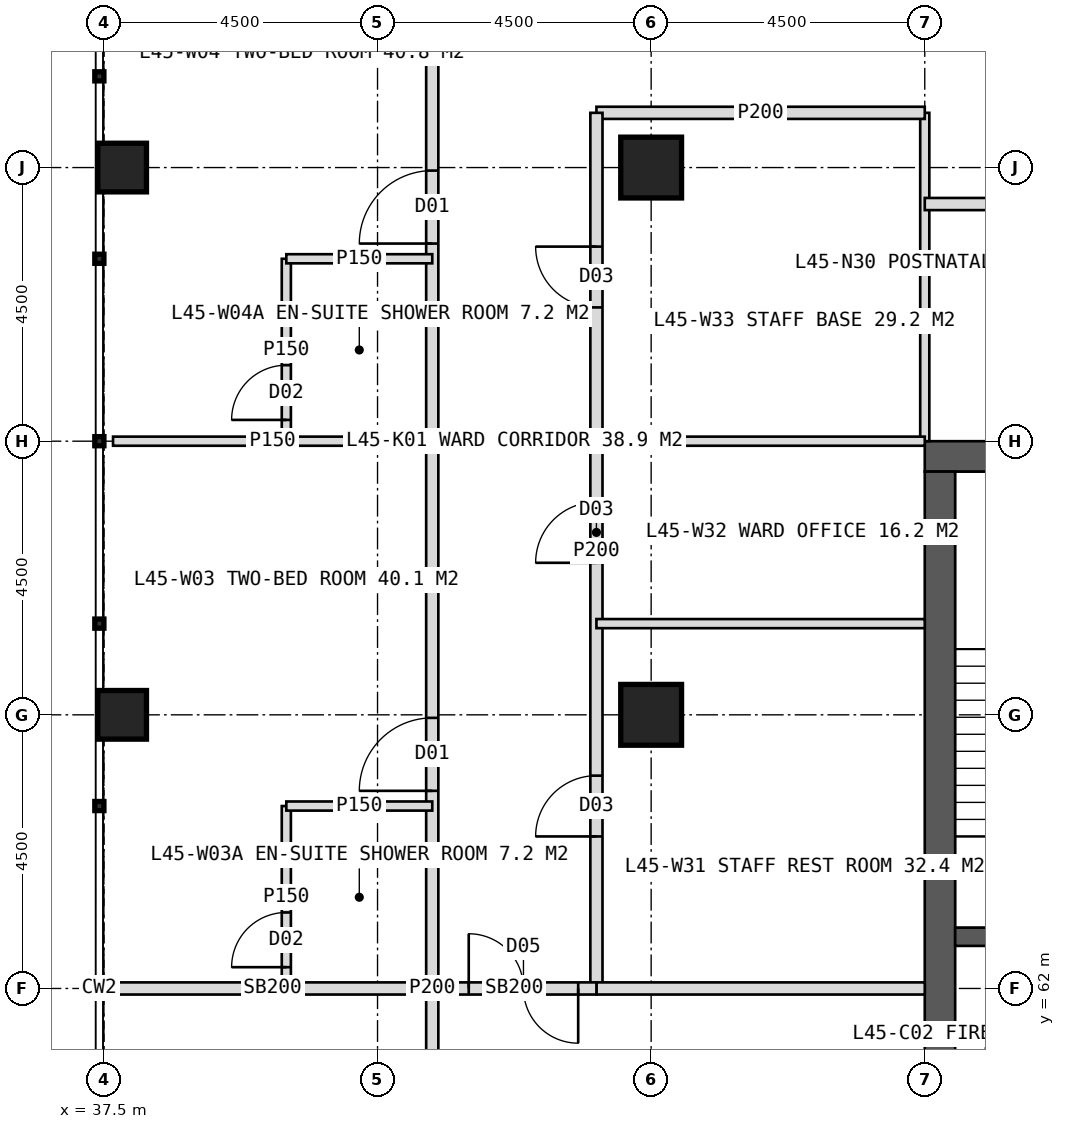
"""IFC4 building model, lengths in metres.
Left out: names, types, materials, properties, quantities, classifications, styles, units other than length and angle.
Written with IfcOpenShell. Run it as: python <this file> out.ifc"""

import sys

from ifc_helpers import new_model, si_unit, direction, frame, frame_2d, origin, origin_2d, place, context, subcontext, project, spatial, rectangle, hollow_rectangle, extrude, element, fill, save


model = new_model("IFC4")
c1 = context("Model", 3, precision=1e-05, world=origin(), true_north=direction((0.0, 1.0)))
c2 = subcontext(c1, "Body", "Model", "MODEL_VIEW")
j1 = project(units=[si_unit("LENGTHUNIT", "METRE"), si_unit("PLANEANGLEUNIT", "RADIAN")], contexts=[c1])
p1 = place(None, origin())
s1 = spatial("IfcSite", under=j1, at=p1, CompositionType="ELEMENT")
p2 = place(p1, origin())
s2 = spatial("IfcBuilding", under=s1, at=p2, CompositionType="ELEMENT")
p3 = place(p2, frame((0.0, 0.0, 189.0)))
s3 = spatial("IfcBuildingStorey", under=s2, at=p3, CompositionType="ELEMENT", Elevation=189.0)
p4 = place(p3, frame((51.0, 70.75, 0.0), z_axis=(0.0, 0.0, 1.0), x_axis=(1.0, 0.0, 0.0)))
e1 = element("IfcWall", 1, at=p4, inside=s3, PredefinedType="SHEAR", context=c2, shape_type="SweptSolid", body=[
    extrude(rectangle(XDim=18.0, YDim=0.5, at=frame_2d((9.0, 0.0))), origin(), (0.0, 0.0, 1.0), 4.0),
])
p5 = place(p4, frame((8.1, 0.0, 0.0)))
e2 = element("IfcOpeningElement", 2, at=p5, cuts=e1, PredefinedType="OPENING", context=c2, shape_type="SweptSolid", body=[
    extrude(rectangle(XDim=1.8, YDim=2.2, at=frame_2d((0.9, 1.1))), frame((0.0, 0.26, 0.0), z_axis=(0.0, -1.0, 0.0), x_axis=(1.0, 0.0, 0.0)), (0.0, 0.0, 1.0), 0.52),
])
p6 = place(p3, frame((51.25, 53.5, 0.0), z_axis=(0.0, 0.0, 1.0), x_axis=(0.0, 1.0, 0.0)))
e3 = element("IfcWall", 3, at=p6, inside=s3, PredefinedType="SHEAR", context=c2, shape_type="SweptSolid", body=[
    extrude(rectangle(XDim=17.0, YDim=0.5, at=frame_2d((8.5, 0.0))), origin(), (0.0, 0.0, 1.0), 4.0),
])
p7 = place(p6, frame((6.1, 0.0, 0.0)))
e4 = element("IfcOpeningElement", 4, at=p7, cuts=e3, PredefinedType="OPENING", context=c2, shape_type="SweptSolid", body=[
    extrude(rectangle(XDim=1.5, YDim=2.2, at=frame_2d((0.75, 1.1))), frame((0.0, 0.26, 0.0), z_axis=(0.0, -1.0, 0.0), x_axis=(1.0, 0.0, 0.0)), (0.0, 0.0, 1.0), 0.52),
])
p8 = place(p3, frame((51.5, 62.85, 0.0), z_axis=(0.0, 0.0, 1.0), x_axis=(1.0, 0.0, 0.0)))
e5 = element("IfcWall", 5, at=p8, inside=s3, PredefinedType="SHEAR", context=c2, shape_type="SweptSolid", body=[
    extrude(rectangle(XDim=3.3, YDim=0.3, at=frame_2d((1.65, 0.0))), origin(), (0.0, 0.0, 1.0), 4.0),
])
p9 = place(p8, frame((1.15, 0.0, 0.0)))
e6 = element("IfcOpeningElement", 6, at=p9, cuts=e5, PredefinedType="OPENING", context=c2, shape_type="SweptSolid", body=[
    extrude(rectangle(XDim=1.2, YDim=2.1, at=frame_2d((0.6, 1.05))), frame((0.0, 0.16, 0.0), z_axis=(0.0, -1.0, 0.0), x_axis=(1.0, 0.0, 0.0)), (0.0, 0.0, 1.0), 0.32),
])
for number, where, z_axis, x_axis in (
    (7, (46.5, 75.5, 0.0), (0.0, 0.0, 1.0), (1.0, 0.0, 0.0)),
    (8, (46.5, 66.5, 0.0), (0.0, 0.0, 1.0), (1.0, 0.0, 0.0)),
):
    element("IfcColumn", number, at=place(p3, frame(where, z_axis=z_axis, x_axis=x_axis)), inside=s3, PredefinedType="COLUMN", context=c2, shape_type="SweptSolid", body=[
        extrude(hollow_rectangle(XDim=1.0, YDim=1.0, WallThickness=0.1, at=origin_2d()), origin(), (0.0, 0.0, 1.0), 4.0),
    ])
for number, where, z_axis, x_axis in (
    (9, (37.8, 66.5, 0.0), (0.0, 0.0, 1.0), (1.0, 0.0, 0.0)),
    (10, (37.8, 75.5, 0.0), (0.0, 0.0, 1.0), (1.0, 0.0, 0.0)),
):
    element("IfcColumn", number, at=place(p3, frame(where, z_axis=z_axis, x_axis=x_axis)), inside=s3, PredefinedType="COLUMN", context=c2, shape_type="SweptSolid", body=[
        extrude(hollow_rectangle(XDim=0.8, YDim=0.8, WallThickness=0.08, at=origin_2d()), origin(), (0.0, 0.0, 1.0), 4.0),
    ])
p10 = place(p3, frame((51.0, 71.0, 0.0), z_axis=(0.0, 0.0, 1.0), x_axis=(0.0, 1.0, 0.0)))
e11 = element("IfcWall", 11, at=p10, inside=s3, PredefinedType="PARTITIONING", context=c2, shape_type="SweptSolid", body=[
    extrude(rectangle(XDim=5.4, YDim=0.15, at=frame_2d((2.7, 0.0))), origin(), (0.0, 0.0, 1.0), 3.75),
])
p11 = place(p3, frame((45.6, 76.4, 0.0), z_axis=(0.0, 0.0, 1.0), x_axis=(1.0, 0.0, 0.0)))
e12 = element("IfcWall", 12, at=p11, inside=s3, PredefinedType="PARTITIONING", context=c2, shape_type="SweptSolid", body=[
    extrude(rectangle(XDim=5.4, YDim=0.2, at=frame_2d((2.7, 0.0))), origin(), (0.0, 0.0, 1.0), 3.75),
])
p12 = place(p3, frame((51.0, 74.9, 0.0), z_axis=(0.0, 0.0, 1.0), x_axis=(1.0, 0.0, 0.0)))
e13 = element("IfcWall", 13, at=p12, inside=s3, PredefinedType="PARTITIONING", context=c2, shape_type="SweptSolid", body=[
    extrude(rectangle(XDim=6.75, YDim=0.2, at=frame_2d((3.375, 0.0))), origin(), (0.0, 0.0, 1.0), 3.75),
])
p13 = place(p12, frame((1.45, 0.0, 0.0)))
e14 = element("IfcOpeningElement", 14, at=p13, cuts=e13, PredefinedType="OPENING", context=c2, shape_type="SweptSolid", body=[
    extrude(rectangle(XDim=1.0, YDim=2.1, at=frame_2d((0.5, 1.05))), frame((0.0, 0.11, 0.0), z_axis=(0.0, -1.0, 0.0), x_axis=(1.0, 0.0, 0.0)), (0.0, 0.0, 1.0), 0.22),
])
p14 = place(p3, frame((42.9, 62.0, 0.0), z_axis=(0.0, 0.0, 1.0), x_axis=(-1.0, 0.0, 0.0)))
e15 = element("IfcWall", 15, at=p14, inside=s3, PredefinedType="SOLIDWALL", context=c2, shape_type="SweptSolid", body=[
    extrude(rectangle(XDim=5.25, YDim=0.2, at=frame_2d((2.625, 0.0))), origin(), (0.0, 0.0, 1.0), 2.95),
])
p15 = place(p3, frame((42.9, 71.0, 0.0), z_axis=(0.0, 0.0, 1.0), x_axis=(-1.0, 0.0, 0.0)))
e16 = element("IfcWall", 16, at=p15, inside=s3, PredefinedType="PARTITIONING", context=c2, shape_type="SweptSolid", body=[
    extrude(rectangle(XDim=5.25, YDim=0.15, at=frame_2d((2.625, 0.0))), origin(), (0.0, 0.0, 1.0), 3.75),
])
p16 = place(p3, frame((42.9, 44.9, 0.0), z_axis=(0.0, 0.0, 1.0), x_axis=(0.0, 1.0, 0.0)))
e17 = element("IfcWall", 17, at=p16, inside=s3, PredefinedType="PARTITIONING", context=c2, shape_type="SweptSolid", body=[
    extrude(rectangle(XDim=34.2, YDim=0.2, at=frame_2d((17.1, 0.0))), origin(), (0.0, 0.0, 1.0), 3.75),
])
p17 = place(p16, frame((3.25, 0.0, 0.0)))
e18 = element("IfcOpeningElement", 18, at=p17, cuts=e17, PredefinedType="OPENING", context=c2, shape_type="SweptSolid", body=[
    extrude(rectangle(XDim=1.2, YDim=2.2, at=frame_2d((0.6, 1.1))), frame((0.0, 0.11, 0.0), z_axis=(0.0, -1.0, 0.0), x_axis=(1.0, 0.0, 0.0)), (0.0, 0.0, 1.0), 0.22),
])
p18 = place(p16, frame((11.35, 0.0, 0.0)))
e19 = element("IfcOpeningElement", 19, at=p18, cuts=e17, PredefinedType="OPENING", context=c2, shape_type="SweptSolid", body=[
    extrude(rectangle(XDim=1.2, YDim=2.2, at=frame_2d((0.6, 1.1))), frame((0.0, 0.11, 0.0), z_axis=(0.0, -1.0, 0.0), x_axis=(1.0, 0.0, 0.0)), (0.0, 0.0, 1.0), 0.22),
])
p19 = place(p16, frame((20.35, 0.0, 0.0)))
e20 = element("IfcOpeningElement", 20, at=p19, cuts=e17, PredefinedType="OPENING", context=c2, shape_type="SweptSolid", body=[
    extrude(rectangle(XDim=1.2, YDim=2.2, at=frame_2d((0.6, 1.1))), frame((0.0, 0.11, 0.0), z_axis=(0.0, -1.0, 0.0), x_axis=(1.0, 0.0, 0.0)), (0.0, 0.0, 1.0), 0.22),
])
p20 = place(p16, frame((29.35, 0.0, 0.0)))
e21 = element("IfcOpeningElement", 21, at=p20, cuts=e17, PredefinedType="OPENING", context=c2, shape_type="SweptSolid", body=[
    extrude(rectangle(XDim=1.2, YDim=2.2, at=frame_2d((0.6, 1.1))), frame((0.0, 0.11, 0.0), z_axis=(0.0, -1.0, 0.0), x_axis=(1.0, 0.0, 0.0)), (0.0, 0.0, 1.0), 0.22),
])
p21 = place(p3, frame((40.5, 62.0, 0.0), z_axis=(0.0, 0.0, 1.0), x_axis=(0.0, 1.0, 0.0)))
e22 = element("IfcWall", 22, at=p21, inside=s3, PredefinedType="PARTITIONING", context=c2, shape_type="SweptSolid", body=[
    extrude(rectangle(XDim=3.0, YDim=0.15, at=frame_2d((1.5, 0.0))), origin(), (0.0, 0.0, 1.0), 3.75),
])
p22 = place(p21, frame((0.35, 0.0, 0.0)))
e23 = element("IfcOpeningElement", 23, at=p22, cuts=e22, PredefinedType="OPENING", context=c2, shape_type="SweptSolid", body=[
    extrude(rectangle(XDim=0.9, YDim=2.1, at=frame_2d((0.45, 1.05))), frame((0.0, 0.085, 0.0), z_axis=(0.0, -1.0, 0.0), x_axis=(1.0, 0.0, 0.0)), (0.0, 0.0, 1.0), 0.17),
])
p23 = place(p3, frame((42.9, 65.0, 0.0), z_axis=(0.0, 0.0, 1.0), x_axis=(-1.0, 0.0, 0.0)))
e24 = element("IfcWall", 24, at=p23, inside=s3, PredefinedType="PARTITIONING", context=c2, shape_type="SweptSolid", body=[
    extrude(rectangle(XDim=2.4, YDim=0.15, at=frame_2d((1.2, 0.0))), origin(), (0.0, 0.0, 1.0), 3.75),
])
p24 = place(p3, frame((40.5, 71.0, 0.0), z_axis=(0.0, 0.0, 1.0), x_axis=(0.0, 1.0, 0.0)))
e25 = element("IfcWall", 25, at=p24, inside=s3, PredefinedType="PARTITIONING", context=c2, shape_type="SweptSolid", body=[
    extrude(rectangle(XDim=3.0, YDim=0.15, at=frame_2d((1.5, 0.0))), origin(), (0.0, 0.0, 1.0), 3.75),
])
p25 = place(p24, frame((0.35, 0.0, 0.0)))
e26 = element("IfcOpeningElement", 26, at=p25, cuts=e25, PredefinedType="OPENING", context=c2, shape_type="SweptSolid", body=[
    extrude(rectangle(XDim=0.9, YDim=2.1, at=frame_2d((0.45, 1.05))), frame((0.0, 0.085, 0.0), z_axis=(0.0, -1.0, 0.0), x_axis=(1.0, 0.0, 0.0)), (0.0, 0.0, 1.0), 0.17),
])
p26 = place(p3, frame((42.9, 74.0, 0.0), z_axis=(0.0, 0.0, 1.0), x_axis=(-1.0, 0.0, 0.0)))
e27 = element("IfcWall", 27, at=p26, inside=s3, PredefinedType="PARTITIONING", context=c2, shape_type="SweptSolid", body=[
    extrude(rectangle(XDim=2.4, YDim=0.15, at=frame_2d((1.2, 0.0))), origin(), (0.0, 0.0, 1.0), 3.75),
])
p27 = place(p3, frame((45.6, 62.0, 0.0), z_axis=(0.0, 0.0, 1.0), x_axis=(0.0, 1.0, 0.0)))
e28 = element("IfcWall", 28, at=p27, inside=s3, PredefinedType="PARTITIONING", context=c2, shape_type="SweptSolid", body=[
    extrude(rectangle(XDim=14.4, YDim=0.2, at=frame_2d((7.2, 0.0))), origin(), (0.0, 0.0, 1.0), 3.75),
])
p28 = place(p27, frame((2.5, 0.0, 0.0)))
e29 = element("IfcOpeningElement", 29, at=p28, cuts=e28, PredefinedType="OPENING", context=c2, shape_type="SweptSolid", body=[
    extrude(rectangle(XDim=1.0, YDim=2.1, at=frame_2d((0.5, 1.05))), frame((0.0, 0.11, 0.0), z_axis=(0.0, -1.0, 0.0), x_axis=(1.0, 0.0, 0.0)), (0.0, 0.0, 1.0), 0.22),
])
p29 = place(p27, frame((7.0, 0.0, 0.0)))
e30 = element("IfcOpeningElement", 30, at=p29, cuts=e28, PredefinedType="OPENING", context=c2, shape_type="SweptSolid", body=[
    extrude(rectangle(XDim=1.0, YDim=2.1, at=frame_2d((0.5, 1.05))), frame((0.0, 0.11, 0.0), z_axis=(0.0, -1.0, 0.0), x_axis=(1.0, 0.0, 0.0)), (0.0, 0.0, 1.0), 0.22),
])
p30 = place(p27, frame((11.2, 0.0, 0.0)))
e31 = element("IfcOpeningElement", 31, at=p30, cuts=e28, PredefinedType="OPENING", context=c2, shape_type="SweptSolid", body=[
    extrude(rectangle(XDim=1.0, YDim=2.1, at=frame_2d((0.5, 1.05))), frame((0.0, 0.11, 0.0), z_axis=(0.0, -1.0, 0.0), x_axis=(1.0, 0.0, 0.0)), (0.0, 0.0, 1.0), 0.22),
])
p31 = place(p3, frame((51.0, 62.0, 0.0), z_axis=(0.0, 0.0, 1.0), x_axis=(-1.0, 0.0, 0.0)))
e32 = element("IfcWall", 32, at=p31, inside=s3, PredefinedType="SOLIDWALL", context=c2, shape_type="SweptSolid", body=[
    extrude(rectangle(XDim=5.4, YDim=0.2, at=frame_2d((2.7, 0.0))), origin(), (0.0, 0.0, 1.0), 2.95),
])
for number, where, z_axis, x_axis in (
    (33, (51.0, 68.0, 0.0), (0.0, 0.0, 1.0), (-1.0, 0.0, 0.0)),
    (34, (51.0, 71.0, 0.0), (0.0, 0.0, 1.0), (-1.0, 0.0, 0.0)),
):
    element("IfcWall", number, at=place(p3, frame(where, z_axis=z_axis, x_axis=x_axis)), inside=s3, PredefinedType="PARTITIONING", context=c2, shape_type="SweptSolid", body=[
        extrude(rectangle(XDim=5.4, YDim=0.15, at=frame_2d((2.7, 0.0))), origin(), (0.0, 0.0, 1.0), 3.75),
    ])
p32 = place(p3, frame((45.6, 62.0, 0.0), z_axis=(0.0, 0.0, 1.0), x_axis=(-1.0, 0.0, 0.0)))
e35 = element("IfcWall", 35, at=p32, inside=s3, PredefinedType="SOLIDWALL", context=c2, shape_type="SweptSolid", body=[
    extrude(rectangle(XDim=2.7, YDim=0.2, at=frame_2d((1.35, 0.0))), origin(), (0.0, 0.0, 1.0), 2.95),
])
p33 = place(p32, frame((0.3, 0.0, 0.0)))
e36 = element("IfcOpeningElement", 36, at=p33, cuts=e35, PredefinedType="OPENING", context=c2, shape_type="SweptSolid", body=[
    extrude(rectangle(XDim=1.8, YDim=2.2, at=frame_2d((0.9, 1.1))), frame((0.0, 0.11, 0.0), z_axis=(0.0, -1.0, 0.0), x_axis=(1.0, 0.0, 0.0)), (0.0, 0.0, 1.0), 0.22),
])
p34 = place(p19, origin())
e37 = element("IfcDoor", 37, at=p34, inside=s3, OperationType="SINGLE_SWING_LEFT", PredefinedType="DOOR", context=c2, shape_type="SweptSolid", body=[
    extrude(rectangle(XDim=1.2, YDim=2.2, at=frame_2d((0.6, 1.1))), frame((0.0, 0.025, 0.0), z_axis=(0.0, -1.0, 0.0), x_axis=(1.0, 0.0, 0.0)), (0.0, 0.0, 1.0), 0.05),
])
fill(e20, e37)
p35 = place(p22, origin())
e38 = element("IfcDoor", 38, at=p35, inside=s3, OperationType="SINGLE_SWING_LEFT", PredefinedType="DOOR", context=c2, shape_type="SweptSolid", body=[
    extrude(rectangle(XDim=0.9, YDim=2.1, at=frame_2d((0.45, 1.05))), frame((0.0, 0.025, 0.0), z_axis=(0.0, -1.0, 0.0), x_axis=(1.0, 0.0, 0.0)), (0.0, 0.0, 1.0), 0.05),
])
fill(e23, e38)
p36 = place(p20, origin())
e39 = element("IfcDoor", 39, at=p36, inside=s3, OperationType="SINGLE_SWING_LEFT", PredefinedType="DOOR", context=c2, shape_type="SweptSolid", body=[
    extrude(rectangle(XDim=1.2, YDim=2.2, at=frame_2d((0.6, 1.1))), frame((0.0, 0.025, 0.0), z_axis=(0.0, -1.0, 0.0), x_axis=(1.0, 0.0, 0.0)), (0.0, 0.0, 1.0), 0.05),
])
fill(e21, e39)
p37 = place(p25, origin())
e40 = element("IfcDoor", 40, at=p37, inside=s3, OperationType="SINGLE_SWING_LEFT", PredefinedType="DOOR", context=c2, shape_type="SweptSolid", body=[
    extrude(rectangle(XDim=0.9, YDim=2.1, at=frame_2d((0.45, 1.05))), frame((0.0, 0.025, 0.0), z_axis=(0.0, -1.0, 0.0), x_axis=(1.0, 0.0, 0.0)), (0.0, 0.0, 1.0), 0.05),
])
fill(e26, e40)
p38 = place(p28, origin())
e41 = element("IfcDoor", 41, at=p38, inside=s3, OperationType="SINGLE_SWING_LEFT", PredefinedType="DOOR", context=c2, shape_type="SweptSolid", body=[
    extrude(rectangle(XDim=1.0, YDim=2.1, at=frame_2d((0.5, 1.05))), frame((0.0, 0.025, 0.0), z_axis=(0.0, -1.0, 0.0), x_axis=(1.0, 0.0, 0.0)), (0.0, 0.0, 1.0), 0.05),
])
fill(e29, e41)
p39 = place(p29, origin())
e42 = element("IfcDoor", 42, at=p39, inside=s3, OperationType="SINGLE_SWING_LEFT", PredefinedType="DOOR", context=c2, shape_type="SweptSolid", body=[
    extrude(rectangle(XDim=1.0, YDim=2.1, at=frame_2d((0.5, 1.05))), frame((0.0, 0.025, 0.0), z_axis=(0.0, -1.0, 0.0), x_axis=(1.0, 0.0, 0.0)), (0.0, 0.0, 1.0), 0.05),
])
fill(e30, e42)
p40 = place(p30, origin())
e43 = element("IfcDoor", 43, at=p40, inside=s3, OperationType="SINGLE_SWING_RIGHT", PredefinedType="DOOR", context=c2, shape_type="SweptSolid", body=[
    extrude(rectangle(XDim=1.0, YDim=2.1, at=frame_2d((0.5, 1.05))), frame((0.0, 0.025, 0.0), z_axis=(0.0, -1.0, 0.0), x_axis=(1.0, 0.0, 0.0)), (0.0, 0.0, 1.0), 0.05),
])
fill(e31, e43)
p41 = place(p33, origin())
e44 = element("IfcDoor", 44, at=p41, inside=s3, OperationType="DOUBLE_DOOR_DOUBLE_SWING", PredefinedType="DOOR", context=c2, shape_type="SweptSolid", body=[
    extrude(rectangle(XDim=1.8, YDim=2.2, at=frame_2d((0.9, 1.1))), frame((0.0, 0.025, 0.0), z_axis=(0.0, -1.0, 0.0), x_axis=(1.0, 0.0, 0.0)), (0.0, 0.0, 1.0), 0.05),
])
fill(e36, e44)
p42 = place(p7, origin())
e45 = element("IfcDoor", 45, at=p42, inside=s3, OperationType="DOUBLE_DOOR_SINGLE_SWING", PredefinedType="DOOR", context=c2, shape_type="SweptSolid", body=[
    extrude(rectangle(XDim=1.5, YDim=2.2, at=frame_2d((0.75, 1.1))), frame((0.0, 0.025, 0.0), z_axis=(0.0, -1.0, 0.0), x_axis=(1.0, 0.0, 0.0)), (0.0, 0.0, 1.0), 0.05),
])
fill(e4, e45)
save(model, sys.argv[1])
